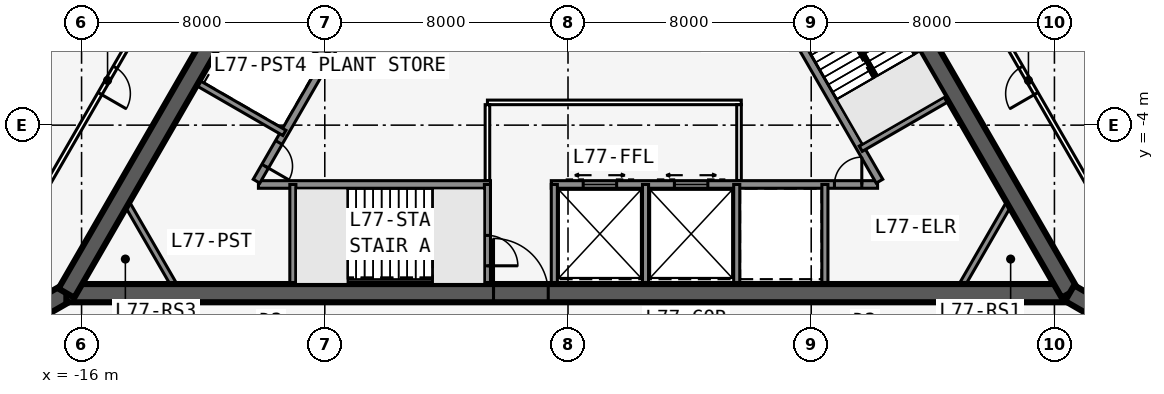
"""IFC4 building model, lengths in metres.
Left out: names, types, materials, properties, quantities, classifications, styles, units other than length and angle.
Written with IfcOpenShell. Run it as: python <this file> out.ifc"""

import sys

from ifc_helpers import new_model, si_unit, direction, frame, frame_2d, origin, place, context, subcontext, project, spatial, rectangle, extrude, element, fill, save


model = new_model("IFC4")
c1 = context("Model", 3, precision=1e-05, world=origin(), true_north=direction((0.0, 1.0)))
c2 = subcontext(c1, "Body", "Model", "MODEL_VIEW")
j1 = project(units=[si_unit("LENGTHUNIT", "METRE"), si_unit("PLANEANGLEUNIT", "RADIAN")], contexts=[c1])
p1 = place(None, origin())
s1 = spatial("IfcSite", under=j1, at=p1, CompositionType="ELEMENT")
p2 = place(p1, origin())
s2 = spatial("IfcBuilding", under=s1, at=p2, CompositionType="ELEMENT")
p3 = place(p2, frame((0.0, 0.0, 297.8)))
s3 = spatial("IfcBuildingStorey", under=s2, at=p3, CompositionType="ELEMENT", Elevation=297.8)
p4 = place(p3, frame((-16.5, -9.526, 0.0), z_axis=(0.0, 0.0, 1.0), x_axis=(1.0, 0.0, 0.0)))
e1 = element("IfcWall", 1, at=p4, inside=s3, PredefinedType="SHEAR", context=c2, shape_type="SweptSolid", body=[
    extrude(rectangle(XDim=33.0, YDim=0.6, at=frame_2d((16.5, 0.0))), origin(), (0.0, 0.0, 1.0), 6.0),
])
p5 = place(p4, frame((14.05, 0.0, 0.0)))
e2 = element("IfcOpeningElement", 2, at=p5, cuts=e1, PredefinedType="OPENING", context=c2, shape_type="SweptSolid", body=[
    extrude(rectangle(XDim=1.8, YDim=2.13, at=frame_2d((0.9, 1.065))), frame((0.0, 0.31, 0.0), z_axis=(0.0, -1.0, 0.0), x_axis=(1.0, 0.0, 0.0)), (0.0, 0.0, 1.0), 0.62),
])
p6 = place(p3, frame((-10.183, -5.951, 0.0), z_axis=(0.0, 0.0, 1.0), x_axis=(1.0, 0.0, 0.0)))
e3 = element("IfcWall", 3, at=p6, inside=s3, PredefinedType="SOLIDWALL", context=c2, shape_type="SweptSolid", body=[
    extrude(rectangle(XDim=7.633, YDim=0.25, at=frame_2d((3.816, 0.0))), origin(), (0.0, 0.0, 1.0), 5.75),
])
p7 = place(p3, frame((-0.55, -5.951, 0.0), z_axis=(0.0, 0.0, 1.0), x_axis=(1.0, 0.0, 0.0)))
e4 = element("IfcWall", 4, at=p7, inside=s3, PredefinedType="SOLIDWALL", context=c2, shape_type="SweptSolid", body=[
    extrude(rectangle(XDim=10.733, YDim=0.25, at=frame_2d((5.366, 0.0))), origin(), (0.0, 0.0, 1.0), 5.75),
])
p8 = place(p7, frame((9.314, 0.0, 0.0)))
e5 = element("IfcOpeningElement", 5, at=p8, cuts=e4, PredefinedType="OPENING", context=c2, shape_type="SweptSolid", body=[
    extrude(rectangle(XDim=0.9, YDim=2.13, at=frame_2d((0.45, 1.065))), frame((0.0, 0.135, 0.0), z_axis=(0.0, -1.0, 0.0), x_axis=(1.0, 0.0, 0.0)), (0.0, 0.0, 1.0), 0.27),
])
p9 = place(p7, frame((1.05, 0.0, 0.0)))
e6 = element("IfcOpeningElement", 6, at=p9, cuts=e4, PredefinedType="OPENING", context=c2, shape_type="SweptSolid", body=[
    extrude(rectangle(XDim=1.1, YDim=2.13, at=frame_2d((0.55, 1.065))), frame((0.0, 0.135, 0.0), z_axis=(0.0, -1.0, 0.0), x_axis=(1.0, 0.0, 0.0)), (0.0, 0.0, 1.0), 0.27),
])
p10 = place(p7, frame((4.05, 0.0, 0.0)))
e7 = element("IfcOpeningElement", 7, at=p10, cuts=e4, PredefinedType="OPENING", context=c2, shape_type="SweptSolid", body=[
    extrude(rectangle(XDim=1.1, YDim=2.13, at=frame_2d((0.55, 1.065))), frame((0.0, 0.135, 0.0), z_axis=(0.0, -1.0, 0.0), x_axis=(1.0, 0.0, 0.0)), (0.0, 0.0, 1.0), 0.27),
])
p11 = place(p3, frame((-9.05, -5.951, 0.0), z_axis=(0.0, 0.0, 1.0), x_axis=(0.0, -1.0, 0.0)))
e8 = element("IfcWall", 8, at=p11, inside=s3, PredefinedType="SOLIDWALL", context=c2, shape_type="SweptSolid", body=[
    extrude(rectangle(XDim=3.275, YDim=0.2, at=frame_2d((1.637, 0.0))), origin(), (0.0, 0.0, 1.0), 5.75),
])
p12 = place(p3, frame((-2.65, -5.951, 0.0), z_axis=(0.0, 0.0, 1.0), x_axis=(0.0, -1.0, 0.0)))
e9 = element("IfcWall", 9, at=p12, inside=s3, PredefinedType="SOLIDWALL", context=c2, shape_type="SweptSolid", body=[
    extrude(rectangle(XDim=3.275, YDim=0.2, at=frame_2d((1.637, 0.0))), origin(), (0.0, 0.0, 1.0), 5.75),
])
p13 = place(p12, frame((1.675, 0.0, 0.0)))
e10 = element("IfcOpeningElement", 10, at=p13, cuts=e9, PredefinedType="OPENING", context=c2, shape_type="SweptSolid", body=[
    extrude(rectangle(XDim=1.0, YDim=2.13, at=frame_2d((0.5, 1.065))), frame((0.0, 0.11, 0.0), z_axis=(0.0, -1.0, 0.0), x_axis=(1.0, 0.0, 0.0)), (0.0, 0.0, 1.0), 0.22),
])
for number, where, z_axis, x_axis in (
    (11, (-0.45, -5.951, 0.0), (0.0, 0.0, 1.0), (0.0, -1.0, 0.0)),
    (12, (2.55, -5.951, 0.0), (0.0, 0.0, 1.0), (0.0, -1.0, 0.0)),
    (13, (5.55, -5.951, 0.0), (0.0, 0.0, 1.0), (0.0, -1.0, 0.0)),
    (14, (8.45, -5.951, 0.0), (0.0, 0.0, 1.0), (0.0, -1.0, 0.0)),
):
    element("IfcWall", number, at=place(p3, frame(where, z_axis=z_axis, x_axis=x_axis)), inside=s3, PredefinedType="SOLIDWALL", context=c2, shape_type="SweptSolid", body=[
        extrude(rectangle(XDim=3.275, YDim=0.2, at=frame_2d((1.637, 0.0))), origin(), (0.0, 0.0, 1.0), 5.75),
    ])
p14 = place(p3, frame((16.5, -9.526, 0.0), z_axis=(0.0, 0.0, 1.0), x_axis=(-0.499999749417, 0.866025548458, 0.0)))
e15 = element("IfcWall", 15, at=p14, inside=s3, PredefinedType="SHEAR", context=c2, shape_type="SweptSolid", body=[
    extrude(rectangle(XDim=33.0, YDim=0.6, at=frame_2d((16.5, 0.0))), origin(), (0.0, 0.0, 1.0), 6.0),
])
p15 = place(p14, frame((14.15, 0.0, 0.0)))
e16 = element("IfcOpeningElement", 16, at=p15, cuts=e15, PredefinedType="OPENING", context=c2, shape_type="SweptSolid", body=[
    extrude(rectangle(XDim=1.8, YDim=2.13, at=frame_2d((0.9, 1.065))), frame((0.0, 0.31, 0.0), z_axis=(0.0, -1.0, 0.0), x_axis=(1.0, 0.0, 0.0)), (0.0, 0.0, 1.0), 0.62),
])
p16 = place(p14, frame((12.6, 0.0, 0.0)))
e17 = element("IfcOpeningElement", 17, at=p16, cuts=e15, PredefinedType="OPENING", context=c2, shape_type="SweptSolid", body=[
    extrude(rectangle(XDim=1.0, YDim=2.13, at=frame_2d((0.5, 1.065))), frame((0.0, 0.31, 0.0), z_axis=(0.0, -1.0, 0.0), x_axis=(1.0, 0.0, 0.0)), (0.0, 0.0, 1.0), 0.62),
])
p17 = place(p3, frame((10.245, -5.843, 0.0), z_axis=(0.0, 0.0, 1.0), x_axis=(-0.499993009313, 0.866029439822, 0.0)))
e18 = element("IfcWall", 18, at=p17, inside=s3, PredefinedType="SOLIDWALL", context=c2, shape_type="SweptSolid", body=[
    extrude(rectangle(XDim=7.733, YDim=0.25, at=frame_2d((3.866, 0.0))), origin(), (0.0, 0.0, 1.0), 5.75),
])
p18 = place(p3, frame((9.629, -4.775, 0.0), z_axis=(0.0, 0.0, 1.0), x_axis=(0.865995643347, 0.500051543047, 0.0)))
e19 = element("IfcWall", 19, at=p18, inside=s3, PredefinedType="SOLIDWALL", context=c2, shape_type="SweptSolid", body=[
    extrude(rectangle(XDim=3.275, YDim=0.2, at=frame_2d((1.638, 0.0))), origin(), (0.0, 0.0, 1.0), 5.75),
])
p19 = place(p3, frame((0.0, 19.052, 0.0), z_axis=(0.0, 0.0, 1.0), x_axis=(-0.499999749417, -0.866025548458, 0.0)))
e20 = element("IfcWall", 20, at=p19, inside=s3, PredefinedType="SHEAR", context=c2, shape_type="SweptSolid", body=[
    extrude(rectangle(XDim=33.0, YDim=0.6, at=frame_2d((16.5, 0.0))), origin(), (0.0, 0.0, 1.0), 6.0),
])
p20 = place(p19, frame((14.15, 0.0, 0.0)))
e21 = element("IfcOpeningElement", 21, at=p20, cuts=e20, PredefinedType="OPENING", context=c2, shape_type="SweptSolid", body=[
    extrude(rectangle(XDim=1.8, YDim=2.13, at=frame_2d((0.9, 1.065))), frame((0.0, 0.31, 0.0), z_axis=(0.0, -1.0, 0.0), x_axis=(1.0, 0.0, 0.0)), (0.0, 0.0, 1.0), 0.62),
])
p21 = place(p19, frame((12.6, 0.0, 0.0)))
e22 = element("IfcOpeningElement", 22, at=p21, cuts=e20, PredefinedType="OPENING", context=c2, shape_type="SweptSolid", body=[
    extrude(rectangle(XDim=1.0, YDim=2.13, at=frame_2d((0.5, 1.065))), frame((0.0, 0.31, 0.0), z_axis=(0.0, -1.0, 0.0), x_axis=(1.0, 0.0, 0.0)), (0.0, 0.0, 1.0), 0.62),
])
p22 = place(p3, frame((-4.929, 3.365, 0.0), z_axis=(0.0, 0.0, 1.0), x_axis=(-0.499991433582, -0.866030349552, 0.0)))
e23 = element("IfcWall", 23, at=p22, inside=s3, PredefinedType="SOLIDWALL", context=c2, shape_type="SweptSolid", body=[
    extrude(rectangle(XDim=10.633, YDim=0.25, at=frame_2d((5.316, 0.0))), origin(), (0.0, 0.0, 1.0), 5.75),
])
p23 = place(p22, frame((9.164, 0.0, 0.0)))
e24 = element("IfcOpeningElement", 24, at=p23, cuts=e23, PredefinedType="OPENING", context=c2, shape_type="SweptSolid", body=[
    extrude(rectangle(XDim=0.9, YDim=2.13, at=frame_2d((0.45, 1.065))), frame((0.0, 0.135, 0.0), z_axis=(0.0, -1.0, 0.0), x_axis=(1.0, 0.0, 0.0)), (0.0, 0.0, 1.0), 0.27),
])
p24 = place(p22, frame((1.1, 0.0, 0.0)))
e25 = element("IfcOpeningElement", 25, at=p24, cuts=e23, PredefinedType="OPENING", context=c2, shape_type="SweptSolid", body=[
    extrude(rectangle(XDim=0.9, YDim=2.13, at=frame_2d((0.45, 1.065))), frame((0.0, 0.135, 0.0), z_axis=(0.0, -1.0, 0.0), x_axis=(1.0, 0.0, 0.0)), (0.0, 0.0, 1.0), 0.27),
])
p25 = place(p22, frame((4.0, 0.0, 0.0)))
e26 = element("IfcOpeningElement", 26, at=p25, cuts=e23, PredefinedType="OPENING", context=c2, shape_type="SweptSolid", body=[
    extrude(rectangle(XDim=0.9, YDim=2.13, at=frame_2d((0.45, 1.065))), frame((0.0, 0.135, 0.0), z_axis=(0.0, -1.0, 0.0), x_axis=(1.0, 0.0, 0.0)), (0.0, 0.0, 1.0), 0.27),
])
for number, where, z_axis, x_axis in (
    (27, (-7.879, -1.744, 0.0), (0.0, 0.0, 1.0), (-0.866, 0.5, 0.0)),
    (28, (-9.329, -4.256, 0.0), (0.0, 0.0, 1.0), (-0.866, 0.5, 0.0)),
):
    element("IfcWall", number, at=place(p3, frame(where, z_axis=z_axis, x_axis=x_axis)), inside=s3, PredefinedType="SOLIDWALL", context=c2, shape_type="SweptSolid", body=[
        extrude(rectangle(XDim=3.275, YDim=0.2, at=frame_2d((1.637, 0.0))), origin(), (0.0, 0.0, 1.0), 5.75),
    ])
p26 = place(p3, frame((16.5, -9.526, 0.0), z_axis=(0.0, 0.0, 1.0), x_axis=(0.866031398331, -0.499989616998, 0.0)))
e29 = element("IfcWall", 29, at=p26, inside=s3, PredefinedType="SHEAR", context=c2, shape_type="SweptSolid", body=[
    extrude(rectangle(XDim=4.746, YDim=0.6, at=frame_2d((2.373, 0.0))), origin(), (0.0, 0.0, 1.0), 6.0),
])
p27 = place(p26, frame((1.65, 0.0, 0.0)))
e30 = element("IfcOpeningElement", 30, at=p27, cuts=e29, PredefinedType="OPENING", context=c2, shape_type="SweptSolid", body=[
    extrude(rectangle(XDim=1.8, YDim=2.13, at=frame_2d((0.9, 1.065))), frame((0.0, 0.31, 0.0), z_axis=(0.0, -1.0, 0.0), x_axis=(1.0, 0.0, 0.0)), (0.0, 0.0, 1.0), 0.62),
])
p28 = place(p3, frame((-16.5, -9.526, 0.0), z_axis=(0.0, 0.0, 1.0), x_axis=(-0.866031398331, -0.499989616998, 0.0)))
e31 = element("IfcWall", 31, at=p28, inside=s3, PredefinedType="SHEAR", context=c2, shape_type="SweptSolid", body=[
    extrude(rectangle(XDim=4.746, YDim=0.6, at=frame_2d((2.373, 0.0))), origin(), (0.0, 0.0, 1.0), 6.0),
])
p29 = place(p28, frame((1.65, 0.0, 0.0)))
e32 = element("IfcOpeningElement", 32, at=p29, cuts=e31, PredefinedType="OPENING", context=c2, shape_type="SweptSolid", body=[
    extrude(rectangle(XDim=1.8, YDim=2.13, at=frame_2d((0.9, 1.065))), frame((0.0, 0.31, 0.0), z_axis=(0.0, -1.0, 0.0), x_axis=(1.0, 0.0, 0.0)), (0.0, 0.0, 1.0), 0.62),
])
p30 = place(p3, frame((20.177, -11.245, 0.0), z_axis=(0.0, 0.0, 1.0), x_axis=(-0.499998875317, 0.866026053119, 0.0)))
e33 = element("IfcWall", 33, at=p30, inside=s3, PredefinedType="PARTITIONING", context=c2, shape_type="SweptSolid", body=[
    extrude(rectangle(XDim=39.654, YDim=0.15, at=frame_2d((19.827, 0.0))), origin(), (0.0, 0.0, 1.0), 5.75),
])
p31 = place(p30, frame((9.563, 0.0, 0.0)))
e34 = element("IfcOpeningElement", 34, at=p31, cuts=e33, PredefinedType="OPENING", context=c2, shape_type="SweptSolid", body=[
    extrude(rectangle(XDim=1.0, YDim=2.13, at=frame_2d((0.5, 1.065))), frame((0.0, 0.085, 0.0), z_axis=(0.0, -1.0, 0.0), x_axis=(1.0, 0.0, 0.0)), (0.0, 0.0, 1.0), 0.17),
])
p32 = place(p30, frame((29.091, 0.0, 0.0)))
e35 = element("IfcOpeningElement", 35, at=p32, cuts=e33, PredefinedType="OPENING", context=c2, shape_type="SweptSolid", body=[
    extrude(rectangle(XDim=1.0, YDim=2.13, at=frame_2d((0.5, 1.065))), frame((0.0, 0.085, 0.0), z_axis=(0.0, -1.0, 0.0), x_axis=(1.0, 0.0, 0.0)), (0.0, 0.0, 1.0), 0.17),
])
p33 = place(p3, frame((-0.35, 23.096, 0.0), z_axis=(0.0, 0.0, 1.0), x_axis=(-0.499998875317, -0.866026053119, 0.0)))
e36 = element("IfcWall", 36, at=p33, inside=s3, PredefinedType="PARTITIONING", context=c2, shape_type="SweptSolid", body=[
    extrude(rectangle(XDim=39.654, YDim=0.15, at=frame_2d((19.827, 0.0))), origin(), (0.0, 0.0, 1.0), 5.75),
])
p34 = place(p33, frame((9.563, 0.0, 0.0)))
e37 = element("IfcOpeningElement", 37, at=p34, cuts=e36, PredefinedType="OPENING", context=c2, shape_type="SweptSolid", body=[
    extrude(rectangle(XDim=1.0, YDim=2.13, at=frame_2d((0.5, 1.065))), frame((0.0, 0.085, 0.0), z_axis=(0.0, -1.0, 0.0), x_axis=(1.0, 0.0, 0.0)), (0.0, 0.0, 1.0), 0.17),
])
p35 = place(p33, frame((29.091, 0.0, 0.0)))
e38 = element("IfcOpeningElement", 38, at=p35, cuts=e36, PredefinedType="OPENING", context=c2, shape_type="SweptSolid", body=[
    extrude(rectangle(XDim=1.0, YDim=2.13, at=frame_2d((0.5, 1.065))), frame((0.0, 0.085, 0.0), z_axis=(0.0, -1.0, 0.0), x_axis=(1.0, 0.0, 0.0)), (0.0, 0.0, 1.0), 0.17),
])
p36 = place(p3, frame((-2.65, -3.251, 0.0), z_axis=(0.0, 0.0, 1.0), x_axis=(1.0, 0.0, 0.0)))
e39 = element("IfcWall", 39, at=p36, inside=s3, PredefinedType="PARTITIONING", context=c2, shape_type="SweptSolid", body=[
    extrude(rectangle(XDim=8.35, YDim=0.15, at=frame_2d((4.175, 0.0))), origin(), (0.0, 0.0, 1.0), 5.75),
])
for number, where, z_axis, x_axis in (
    (40, (-2.65, -5.826, 0.0), (0.0, 0.0, 1.0), (0.0, 1.0, 0.0)),
    (41, (5.625, -5.826, 0.0), (0.0, 0.0, 1.0), (0.0, 1.0, 0.0)),
):
    element("IfcWall", number, at=place(p3, frame(where, z_axis=z_axis, x_axis=x_axis)), inside=s3, PredefinedType="PARTITIONING", context=c2, shape_type="SweptSolid", body=[
        extrude(rectangle(XDim=2.5, YDim=0.15, at=frame_2d((1.25, 0.0))), origin(), (0.0, 0.0, 1.0), 5.75),
    ])
for number, where, z_axis, x_axis in (
    (42, (14.479, -6.626, 0.0), (0.0, 0.0, 1.0), (-0.5, -0.866, 0.0)),
    (43, (-12.978, -9.226, 0.0), (0.0, 0.0, 1.0), (-0.5, 0.866, 0.0)),
):
    element("IfcWall", number, at=place(p3, frame(where, z_axis=z_axis, x_axis=x_axis)), inside=s3, PredefinedType="SOLIDWALL", context=c2, shape_type="SweptSolid", body=[
        extrude(rectangle(XDim=3.002, YDim=0.2, at=frame_2d((1.501, 0.0))), origin(), (0.0, 0.0, 1.0), 5.75),
    ])
p37 = place(p3, frame((-7.247, -7.576, 0.0), z_axis=(0.0, 0.0, 1.0), x_axis=(1.0, 0.0, 0.0)))
e44 = element("IfcWall", 44, at=p37, inside=s3, PredefinedType="SOLIDWALL", context=c2, shape_type="SweptSolid", body=[
    extrude(rectangle(XDim=2.794, YDim=0.1, at=frame_2d((1.397, 0.0))), origin(), (0.0, 0.0, 1.0), 6.0),
])
p38 = place(p3, frame((10.135, -2.401, 0.0), z_axis=(0.0, 0.0, 1.0), x_axis=(-0.499992232847, 0.866029888106, 0.0)))
e45 = element("IfcWall", 45, at=p38, inside=s3, PredefinedType="SOLIDWALL", context=c2, shape_type="SweptSolid", body=[
    extrude(rectangle(XDim=2.794, YDim=0.1, at=frame_2d((1.397, 0.0))), origin(), (0.0, 0.0, 1.0), 6.0),
])
p39 = place(p31, origin())
e46 = element("IfcDoor", 46, at=p39, inside=s3, OperationType="SINGLE_SWING_LEFT", PredefinedType="DOOR", context=c2, shape_type="SweptSolid", body=[
    extrude(rectangle(XDim=1.0, YDim=2.13, at=frame_2d((0.5, 1.065))), frame((0.0, 0.025, 0.0), z_axis=(0.0, -1.0, 0.0), x_axis=(1.0, 0.0, 0.0)), (0.0, 0.0, 1.0), 0.05),
])
fill(e34, e46)
p40 = place(p35, origin())
e47 = element("IfcDoor", 47, at=p40, inside=s3, OperationType="SINGLE_SWING_RIGHT", PredefinedType="DOOR", context=c2, shape_type="SweptSolid", body=[
    extrude(rectangle(XDim=1.0, YDim=2.13, at=frame_2d((0.5, 1.065))), frame((0.0, 0.025, 0.0), z_axis=(0.0, -1.0, 0.0), x_axis=(1.0, 0.0, 0.0)), (0.0, 0.0, 1.0), 0.05),
])
fill(e38, e47)
p41 = place(p5, origin())
e48 = element("IfcDoor", 48, at=p41, inside=s3, OperationType="DOUBLE_DOOR_SINGLE_SWING", PredefinedType="DOOR", context=c2, shape_type="SweptSolid", body=[
    extrude(rectangle(XDim=1.8, YDim=2.13, at=frame_2d((0.9, 1.065))), frame((0.0, 0.025, 0.0), z_axis=(0.0, -1.0, 0.0), x_axis=(1.0, 0.0, 0.0)), (0.0, 0.0, 1.0), 0.05),
])
fill(e2, e48)
p42 = place(p13, origin())
e49 = element("IfcDoor", 49, at=p42, inside=s3, OperationType="SINGLE_SWING_RIGHT", PredefinedType="DOOR", context=c2, shape_type="SweptSolid", body=[
    extrude(rectangle(XDim=1.0, YDim=2.13, at=frame_2d((0.5, 1.065))), frame((0.0, 0.025, 0.0), z_axis=(0.0, -1.0, 0.0), x_axis=(1.0, 0.0, 0.0)), (0.0, 0.0, 1.0), 0.05),
])
fill(e10, e49)
p43 = place(p8, origin())
e50 = element("IfcDoor", 50, at=p43, inside=s3, OperationType="SINGLE_SWING_RIGHT", PredefinedType="DOOR", context=c2, shape_type="SweptSolid", body=[
    extrude(rectangle(XDim=0.9, YDim=2.13, at=frame_2d((0.45, 1.065))), frame((0.0, 0.025, 0.0), z_axis=(0.0, -1.0, 0.0), x_axis=(1.0, 0.0, 0.0)), (0.0, 0.0, 1.0), 0.05),
])
fill(e5, e50)
p44 = place(p23, origin())
e51 = element("IfcDoor", 51, at=p44, inside=s3, OperationType="SINGLE_SWING_RIGHT", PredefinedType="DOOR", context=c2, shape_type="SweptSolid", body=[
    extrude(rectangle(XDim=0.9, YDim=2.13, at=frame_2d((0.45, 1.065))), frame((0.0, 0.025, 0.0), z_axis=(0.0, -1.0, 0.0), x_axis=(1.0, 0.0, 0.0)), (0.0, 0.0, 1.0), 0.05),
])
fill(e24, e51)
p45 = place(p9, origin())
e52 = element("IfcDoor", 52, at=p45, inside=s3, OperationType="DOUBLE_DOOR_SLIDING", PredefinedType="USERDEFINED", context=c2, shape_type="SweptSolid", body=[
    extrude(rectangle(XDim=1.1, YDim=2.13, at=frame_2d((0.55, 1.065))), frame((0.0, 0.025, 0.0), z_axis=(0.0, -1.0, 0.0), x_axis=(1.0, 0.0, 0.0)), (0.0, 0.0, 1.0), 0.05),
])
fill(e6, e52)
p46 = place(p10, origin())
e53 = element("IfcDoor", 53, at=p46, inside=s3, OperationType="DOUBLE_DOOR_SLIDING", PredefinedType="USERDEFINED", context=c2, shape_type="SweptSolid", body=[
    extrude(rectangle(XDim=1.1, YDim=2.13, at=frame_2d((0.55, 1.065))), frame((0.0, 0.025, 0.0), z_axis=(0.0, -1.0, 0.0), x_axis=(1.0, 0.0, 0.0)), (0.0, 0.0, 1.0), 0.05),
])
fill(e7, e53)
save(model, sys.argv[1])
